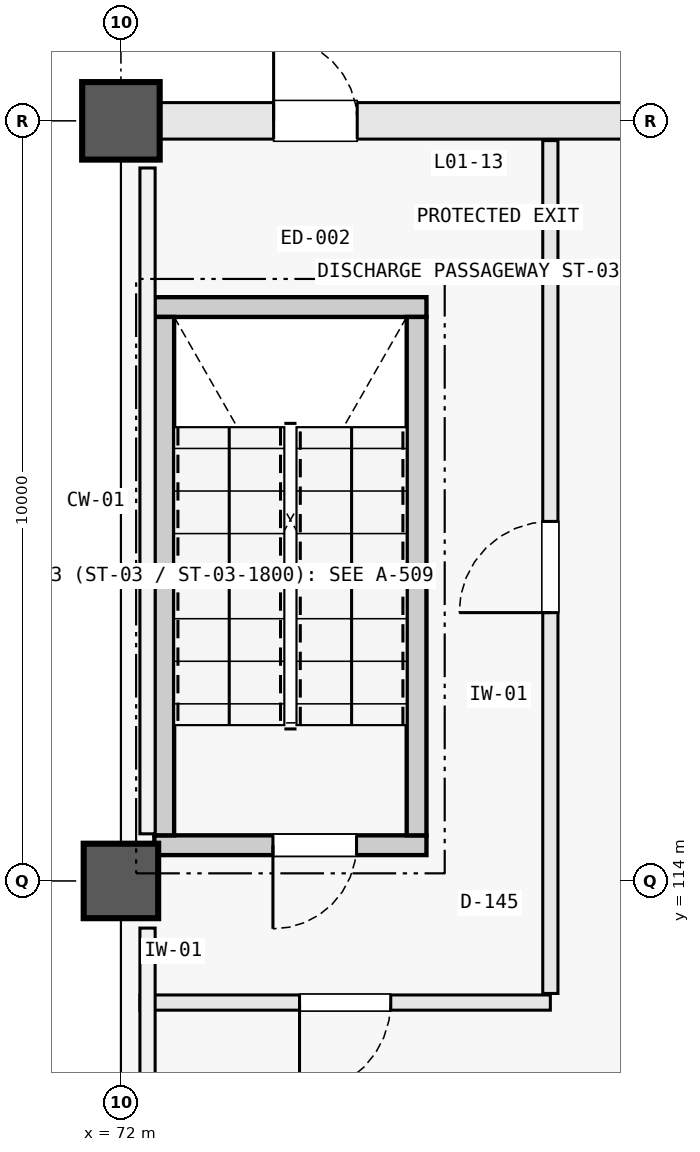
"""IFC4 building model, lengths in metres.
Left out: names, types, materials, properties, quantities, classifications, styles, units other than length and angle.
Written with IfcOpenShell. Run it as: python <this file> out.ifc"""

import sys

from ifc_helpers import new_model, si_unit, direction, frame, frame_2d, origin, origin_2d, place, context, subcontext, project, spatial, rectangle, circle, extrude, element, fill, save


model = new_model("IFC4")
c1 = context("Model", 3, precision=1e-05, world=origin(), true_north=direction((0.0, 1.0)))
c2 = subcontext(c1, "Body", "Model", "MODEL_VIEW")
j1 = project(units=[si_unit("LENGTHUNIT", "METRE"), si_unit("PLANEANGLEUNIT", "RADIAN")], contexts=[c1])
p1 = place(None, origin())
s1 = spatial("IfcSite", under=j1, at=p1, CompositionType="ELEMENT")
p2 = place(p1, origin())
s2 = spatial("IfcBuilding", under=s1, at=p2, CompositionType="ELEMENT")
p3 = place(p2, origin())
s3 = spatial("IfcBuildingStorey", under=s2, at=p3, CompositionType="ELEMENT", Elevation=0.0)
p4 = place(p3, frame((72.0, 114.0, 0.0), z_axis=(0.0, 0.0, 1.0), x_axis=(1.0, 0.0, 0.0)))
e1 = element("IfcColumn", 1, at=p4, inside=s3, PredefinedType="COLUMN", context=c2, shape_type="SweptSolid", body=[
    extrude(rectangle(XDim=0.98, YDim=0.98, at=origin_2d()), origin(), (0.0, 0.0, 1.0), 5.4),
])
p5 = place(p3, frame((72.0, 124.0, 0.0), z_axis=(0.0, 0.0, 1.0), x_axis=(1.0, 0.0, 0.0)))
e2 = element("IfcColumn", 2, at=p5, inside=s3, PredefinedType="COLUMN", context=c2, shape_type="SweptSolid", body=[
    extrude(circle(Radius=0.51, at=origin_2d()), origin(), (0.0, 0.0, 1.0), 5.4),
])
p6 = place(p3, frame((72.459, 124.0, 0.0), z_axis=(0.0, 0.0, 1.0), x_axis=(1.0, 0.0, 0.0)))
e3 = element("IfcWall", 3, at=p6, inside=s3, PredefinedType="STANDARD", context=c2, shape_type="SweptSolid", body=[
    extrude(rectangle(XDim=7.056, YDim=0.48, at=frame_2d((3.528, 0.0))), origin(), (0.0, 0.0, 1.0), 3.91),
])
p7 = place(p6, frame((1.55, 0.0, 0.0)))
e4 = element("IfcOpeningElement", 4, at=p7, cuts=e3, PredefinedType="OPENING", context=c2, shape_type="SweptSolid", body=[
    extrude(rectangle(XDim=1.1, YDim=2.25, at=frame_2d((0.55, 1.125))), frame((0.0, 0.252, 0.0), z_axis=(0.0, -1.0, 0.0), x_axis=(1.0, 0.0, 0.0)), (0.0, 0.0, 1.0), 0.504),
])
p8 = place(p3, frame((72.44, 114.47, 0.0), z_axis=(0.0, 0.0, 1.0), x_axis=(1.0, 0.0, 0.0)))
e5 = element("IfcWall", 5, at=p8, inside=s3, PredefinedType="SOLIDWALL", context=c2, shape_type="SweptSolid", body=[
    extrude(rectangle(XDim=3.58, YDim=0.26, at=frame_2d((1.79, 0.0))), origin(), (0.0, 0.0, 1.0), 5.4),
])
p9 = place(p8, frame((1.56, 0.0, 0.0)))
e6 = element("IfcOpeningElement", 6, at=p9, cuts=e5, PredefinedType="OPENING", context=c2, shape_type="SweptSolid", body=[
    extrude(rectangle(XDim=1.1, YDim=2.2, at=frame_2d((0.55, 1.1))), frame((0.0, 0.142, 0.0), z_axis=(0.0, -1.0, 0.0), x_axis=(1.0, 0.0, 0.0)), (0.0, 0.0, 1.0), 0.284),
])
p10 = place(p3, frame((72.44, 121.55, 0.0), z_axis=(0.0, 0.0, 1.0), x_axis=(1.0, 0.0, 0.0)))
e7 = element("IfcWall", 7, at=p10, inside=s3, PredefinedType="SOLIDWALL", context=c2, shape_type="SweptSolid", body=[
    extrude(rectangle(XDim=3.58, YDim=0.26, at=frame_2d((1.79, 0.0))), origin(), (0.0, 0.0, 1.0), 5.4),
])
for number, where, z_axis, x_axis in (
    (8, (72.57, 114.6, 0.0), (0.0, 0.0, 1.0), (0.0, 1.0, 0.0)),
    (9, (75.89, 114.6, 0.0), (0.0, 0.0, 1.0), (0.0, 1.0, 0.0)),
):
    element("IfcWall", number, at=place(p3, frame(where, z_axis=z_axis, x_axis=x_axis)), inside=s3, PredefinedType="SOLIDWALL", context=c2, shape_type="SweptSolid", body=[
        extrude(rectangle(XDim=6.82, YDim=0.26, at=frame_2d((3.41, 0.0))), origin(), (0.0, 0.0, 1.0), 5.4),
    ])
p11 = place(p3, frame((72.25, 112.4, 0.0), z_axis=(0.0, 0.0, 1.0), x_axis=(1.0, 0.0, 0.0)))
e10 = element("IfcWall", 10, at=p11, inside=s3, PredefinedType="PARTITIONING", context=c2, shape_type="SweptSolid", body=[
    extrude(rectangle(XDim=5.4, YDim=0.2, at=frame_2d((2.7, 0.0))), origin(), (0.0, 0.0, 1.0), 3.88),
])
p12 = place(p11, frame((2.1, 0.0, 0.0)))
e11 = element("IfcOpeningElement", 11, at=p12, cuts=e10, PredefinedType="OPENING", context=c2, shape_type="SweptSolid", body=[
    extrude(rectangle(XDim=1.2, YDim=2.25, at=frame_2d((0.6, 1.125))), frame((0.0, 0.112, 0.0), z_axis=(0.0, -1.0, 0.0), x_axis=(1.0, 0.0, 0.0)), (0.0, 0.0, 1.0), 0.224),
])
p13 = place(p3, frame((77.65, 112.52, 0.0), z_axis=(0.0, 0.0, 1.0), x_axis=(0.0, 1.0, 0.0)))
e12 = element("IfcWall", 12, at=p13, inside=s3, PredefinedType="PARTITIONING", context=c2, shape_type="SweptSolid", body=[
    extrude(rectangle(XDim=11.22, YDim=0.2, at=frame_2d((5.61, 0.0))), origin(), (0.0, 0.0, 1.0), 3.88),
])
p14 = place(p13, frame((5.01, 0.0, 0.0)))
e13 = element("IfcOpeningElement", 13, at=p14, cuts=e12, PredefinedType="OPENING", context=c2, shape_type="SweptSolid", body=[
    extrude(rectangle(XDim=1.2, YDim=2.25, at=frame_2d((0.6, 1.125))), frame((0.0, 0.112, 0.0), z_axis=(0.0, -1.0, 0.0), x_axis=(1.0, 0.0, 0.0)), (0.0, 0.0, 1.0), 0.224),
])
p15 = place(p7, origin())
e14 = element("IfcDoor", 14, at=p15, inside=s3, OperationType="SINGLE_SWING_LEFT", PredefinedType="DOOR", context=c2, shape_type="SweptSolid", body=[
    extrude(rectangle(XDim=1.1, YDim=2.25, at=frame_2d((0.55, 1.125))), frame((0.0, 0.025, 0.0), z_axis=(0.0, -1.0, 0.0), x_axis=(1.0, 0.0, 0.0)), (0.0, 0.0, 1.0), 0.05),
])
fill(e4, e14)
p16 = place(p9, frame((1.1, 0.0, 0.0), z_axis=(0.0, 0.0, 1.0), x_axis=(-1.0, 0.0, 0.0)))
e15 = element("IfcDoor", 15, at=p16, inside=s3, OperationType="SINGLE_SWING_LEFT", PredefinedType="DOOR", context=c2, shape_type="SweptSolid", body=[
    extrude(rectangle(XDim=1.1, YDim=2.2, at=frame_2d((0.55, 1.1))), frame((0.0, 0.025, 0.0), z_axis=(0.0, -1.0, 0.0), x_axis=(1.0, 0.0, 0.0)), (0.0, 0.0, 1.0), 0.05),
])
fill(e6, e15)
p17 = place(p12, frame((1.2, 0.0, 0.0), z_axis=(0.0, 0.0, 1.0), x_axis=(-1.0, 0.0, 0.0)))
e16 = element("IfcDoor", 16, at=p17, inside=s3, OperationType="SINGLE_SWING_LEFT", PredefinedType="DOOR", context=c2, shape_type="SweptSolid", body=[
    extrude(rectangle(XDim=1.2, YDim=2.25, at=frame_2d((0.6, 1.125))), frame((0.0, 0.025, 0.0), z_axis=(0.0, -1.0, 0.0), x_axis=(1.0, 0.0, 0.0)), (0.0, 0.0, 1.0), 0.05),
])
fill(e11, e16)
p18 = place(p14, origin())
e17 = element("IfcDoor", 17, at=p18, inside=s3, OperationType="SINGLE_SWING_LEFT", PredefinedType="DOOR", context=c2, shape_type="SweptSolid", body=[
    extrude(rectangle(XDim=1.2, YDim=2.25, at=frame_2d((0.6, 1.125))), frame((0.0, 0.025, 0.0), z_axis=(0.0, -1.0, 0.0), x_axis=(1.0, 0.0, 0.0)), (0.0, 0.0, 1.0), 0.05),
])
fill(e13, e17)
save(model, sys.argv[1])
